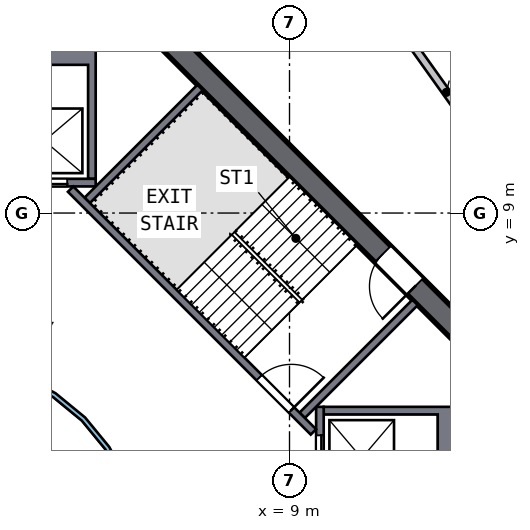
"""IFC4 building model, lengths in metres.
Left out: names, types, materials, properties, quantities, classifications, styles, units other than length and angle.
Written with IfcOpenShell. Run it as: python <this file> out.ifc"""

import sys

from ifc_helpers import new_model, si_unit, direction, frame, frame_2d, origin, place, context, subcontext, project, spatial, polyline, rectangle, outline, extrude, element, fill, save


model = new_model("IFC4")
c1 = context("Model", 3, precision=1e-05, world=origin(), true_north=direction((0.0, 1.0)))
c2 = subcontext(c1, "Body", "Model", "MODEL_VIEW")
j1 = project(units=[si_unit("LENGTHUNIT", "METRE"), si_unit("PLANEANGLEUNIT", "RADIAN")], contexts=[c1])
p1 = place(None, origin())
s1 = spatial("IfcSite", under=j1, at=p1, CompositionType="ELEMENT")
p2 = place(p1, origin())
s2 = spatial("IfcBuilding", under=s1, at=p2, CompositionType="ELEMENT")
p3 = place(p2, frame((0.0, 0.0, 180.0)))
s3 = spatial("IfcBuildingStorey", under=s2, at=p3, CompositionType="ELEMENT", Elevation=180.0)
p4 = place(p3, frame((13.788, 5.587, 0.0), z_axis=(0.0, 0.0, 1.0), x_axis=(-0.707106781, 0.707106781, 0.0)))
e1 = element("IfcWall", 1, at=p4, inside=s3, PredefinedType="SHEAR", context=c2, shape_type="SweptSolid", body=[
    extrude(rectangle(XDim=11.598, YDim=0.6, at=frame_2d((5.799, 0.0))), origin(), (0.0, 0.0, 1.0), 3.5),
])
p5 = place(p4, frame((2.099, 0.0, 0.0)))
e2 = element("IfcOpeningElement", 2, at=p5, cuts=e1, PredefinedType="OPENING", context=c2, shape_type="SweptSolid", body=[
    extrude(rectangle(XDim=1.2, YDim=2.1, at=frame_2d((0.6, 1.05))), frame((0.0, 0.31, 0.0), z_axis=(0.0, -1.0, 0.0), x_axis=(1.0, 0.0, 0.0)), (0.0, 0.0, 1.0), 0.62),
])
p6 = place(p3, origin())
e3 = element("IfcWall", 3, at=p6, inside=s3, PredefinedType="SOLIDWALL", context=c2, shape_type="SweptSolid", body=[
    extrude(outline(polyline([(13.4, 3.9), (13.4, 1.2), (9.9, 1.2), (9.9, 1.4), (12.9, 1.4), (12.9, 3.7), (9.9, 3.7), (9.9, 3.9), (13.4, 3.9)])), origin(), (0.0, 0.0, 1.0), 3.19),
])
p7 = place(p3, frame((9.8, 1.2, 0.0), z_axis=(0.0, 0.0, 1.0), x_axis=(0.0, 1.0, 0.0)))
e4 = element("IfcWall", 4, at=p7, inside=s3, PredefinedType="SOLIDWALL", context=c2, shape_type="SweptSolid", body=[
    extrude(rectangle(XDim=2.7, YDim=0.2, at=frame_2d((1.35, 0.0))), origin(), (0.0, 0.0, 1.0), 3.19),
])
p8 = place(p7, frame((0.75, 0.0, 0.0)))
e5 = element("IfcOpeningElement", 5, at=p8, cuts=e4, PredefinedType="OPENING", context=c2, shape_type="SweptSolid", body=[
    extrude(rectangle(XDim=1.2, YDim=2.1, at=frame_2d((0.6, 1.05))), frame((0.0, 0.11, 0.0), z_axis=(0.0, -1.0, 0.0), x_axis=(1.0, 0.0, 0.0)), (0.0, 0.0, 1.0), 0.22),
])
p9 = place(p3, origin())
e6 = element("IfcWall", 6, at=p9, inside=s3, PredefinedType="SOLIDWALL", context=c2, shape_type="SweptSolid", body=[
    extrude(outline(polyline([(3.9, 9.9), (3.7, 9.9), (3.7, 12.9), (1.4, 12.9), (1.4, 9.9), (1.2, 9.9), (1.2, 13.4), (3.9, 13.4), (3.9, 9.9)])), origin(), (0.0, 0.0, 1.0), 3.19),
])
p10 = place(p3, frame((1.2, 9.8, 0.0), z_axis=(0.0, 0.0, 1.0), x_axis=(1.0, 0.0, 0.0)))
e7 = element("IfcWall", 7, at=p10, inside=s3, PredefinedType="SOLIDWALL", context=c2, shape_type="SweptSolid", body=[
    extrude(rectangle(XDim=2.7, YDim=0.2, at=frame_2d((1.35, 0.0))), origin(), (0.0, 0.0, 1.0), 3.19),
])
p11 = place(p10, frame((0.75, 0.0, 0.0)))
e8 = element("IfcOpeningElement", 8, at=p11, cuts=e7, PredefinedType="OPENING", context=c2, shape_type="SweptSolid", body=[
    extrude(rectangle(XDim=1.2, YDim=2.1, at=frame_2d((0.6, 1.05))), frame((0.0, 0.11, 0.0), z_axis=(0.0, -1.0, 0.0), x_axis=(1.0, 0.0, 0.0)), (0.0, 0.0, 1.0), 0.22),
])
p12 = place(p3, frame((3.24, 9.629, 0.0), z_axis=(0.0, 0.0, 1.0), x_axis=(0.707106781, -0.707106781, 0.0)))
e9 = element("IfcWall", 9, at=p12, inside=s3, PredefinedType="SOLIDWALL", context=c2, shape_type="SweptSolid", body=[
    extrude(rectangle(XDim=9.036, YDim=0.2, at=frame_2d((4.518, 0.0))), origin(), (0.0, 0.0, 1.0), 3.19),
])
p13 = place(p12, frame((7.018, 0.0, 0.0)))
e10 = element("IfcOpeningElement", 10, at=p13, cuts=e9, PredefinedType="OPENING", context=c2, shape_type="SweptSolid", body=[
    extrude(rectangle(XDim=1.2, YDim=2.1, at=frame_2d((0.6, 1.05))), frame((0.0, 0.11, 0.0), z_axis=(0.0, -1.0, 0.0), x_axis=(1.0, 0.0, 0.0)), (0.0, 0.0, 1.0), 0.22),
])
for number, where, z_axis, x_axis in (
    (11, (9.334, 3.677, 0.0), (0.0, 0.0, 1.0), (0.707, 0.707, 0.0)),
    (12, (3.677, 9.334, 0.0), (0.0, 0.0, 1.0), (0.707, 0.707, 0.0)),
):
    element("IfcWall", number, at=place(p3, frame(where, z_axis=z_axis, x_axis=x_axis)), inside=s3, PredefinedType="SOLIDWALL", context=c2, shape_type="SweptSolid", body=[
        extrude(rectangle(XDim=4.2, YDim=0.2, at=frame_2d((2.1, 0.0))), origin(), (0.0, 0.0, 1.0), 3.19),
    ])
p14 = place(p3, origin())
e13 = element("IfcWall", 13, at=p14, inside=s3, PredefinedType="SOLIDWALL", context=c2, shape_type="SweptSolid", body=[
    extrude(outline(polyline([(5.021, -0.999), (4.73, -1.959), (4.257, -2.844), (3.62, -3.62), (2.844, -4.257), (1.959, -4.73), (0.999, -5.021), (0.0, -5.12), (-0.999, -5.021), (-1.959, -4.73), (-2.844, -4.257), (-3.62, -3.62), (-4.257, -2.844), (-4.73, -1.959), (-5.021, -0.999), (-5.12, 0.0), (-5.021, 0.999), (-4.73, 1.959), (-4.257, 2.844), (-3.62, 3.62), (-2.844, 4.257), (-1.959, 4.73), (-0.999, 5.021), (0.0, 5.12), (0.999, 5.021), (1.959, 4.73), (2.844, 4.257), (3.62, 3.62), (4.257, 2.844), (4.73, 1.959), (5.021, 0.999), (5.12, 0.0), (5.021, -0.999)]), holes=[polyline([(4.904, 0.976), (4.619, 1.913), (4.157, 2.778), (3.535, 3.535), (2.778, 4.157), (1.913, 4.619), (0.976, 4.904), (0.0, 5.0), (-0.976, 4.904), (-1.913, 4.619), (-2.778, 4.157), (-3.535, 3.535), (-4.157, 2.778), (-4.619, 1.913), (-4.904, 0.976), (-5.0, 0.0), (-4.904, -0.976), (-4.619, -1.913), (-4.157, -2.778), (-3.535, -3.535), (-2.778, -4.157), (-1.913, -4.619), (-0.976, -4.904), (0.0, -5.0), (0.976, -4.904), (1.913, -4.619), (2.778, -4.157), (3.535, -3.535), (4.157, -2.778), (4.619, -1.913), (4.904, -0.976), (5.0, 0.0), (4.904, 0.976)])]), origin(), (0.0, 0.0, 1.0), 3.19),
])
p15 = place(p3, frame((11.689, 14.19, 0.0), z_axis=(0.0, 0.0, 1.0), x_axis=(0.581002663, -0.813901656, 0.0)))
e14 = element("IfcWall", 14, at=p15, inside=s3, PredefinedType="SOLIDWALL", context=c2, shape_type="SweptSolid", body=[
    extrude(rectangle(XDim=9.316, YDim=0.2, at=frame_2d((4.658, 0.0))), origin(), (0.0, 0.0, 1.0), 3.19),
])
p16 = place(p15, frame((5.15, 0.0, 0.0)))
e15 = element("IfcOpeningElement", 15, at=p16, cuts=e14, PredefinedType="OPENING", context=c2, shape_type="SweptSolid", body=[
    extrude(rectangle(XDim=1.0, YDim=2.1, at=frame_2d((0.5, 1.05))), frame((0.0, 0.11, 0.0), z_axis=(0.0, -1.0, 0.0), x_axis=(1.0, 0.0, 0.0)), (0.0, 0.0, 1.0), 0.22),
])
p17 = place(p8, origin())
e16 = element("IfcDoor", 16, at=p17, inside=s3, OperationType="DOUBLE_DOOR_SLIDING", PredefinedType="DOOR", context=c2, shape_type="SweptSolid", body=[
    extrude(rectangle(XDim=1.2, YDim=2.1, at=frame_2d((0.6, 1.05))), frame((0.0, 0.025, 0.0), z_axis=(0.0, -1.0, 0.0), x_axis=(1.0, 0.0, 0.0)), (0.0, 0.0, 1.0), 0.05),
])
fill(e5, e16)
p18 = place(p11, origin())
e17 = element("IfcDoor", 17, at=p18, inside=s3, OperationType="DOUBLE_DOOR_SLIDING", PredefinedType="DOOR", context=c2, shape_type="SweptSolid", body=[
    extrude(rectangle(XDim=1.2, YDim=2.1, at=frame_2d((0.6, 1.05))), frame((0.0, 0.025, 0.0), z_axis=(0.0, -1.0, 0.0), x_axis=(1.0, 0.0, 0.0)), (0.0, 0.0, 1.0), 0.05),
])
fill(e8, e17)
p19 = place(p13, origin())
e18 = element("IfcDoor", 18, at=p19, inside=s3, OperationType="SINGLE_SWING_RIGHT", PredefinedType="DOOR", context=c2, shape_type="SweptSolid", body=[
    extrude(rectangle(XDim=1.2, YDim=2.1, at=frame_2d((0.6, 1.05))), frame((0.0, 0.025, 0.0), z_axis=(0.0, -1.0, 0.0), x_axis=(1.0, 0.0, 0.0)), (0.0, 0.0, 1.0), 0.05),
])
fill(e10, e18)
p20 = place(p5, origin())
e19 = element("IfcDoor", 19, at=p20, inside=s3, OperationType="SINGLE_SWING_LEFT", PredefinedType="DOOR", context=c2, shape_type="SweptSolid", body=[
    extrude(rectangle(XDim=1.2, YDim=2.1, at=frame_2d((0.6, 1.05))), frame((0.0, 0.025, 0.0), z_axis=(0.0, -1.0, 0.0), x_axis=(1.0, 0.0, 0.0)), (0.0, 0.0, 1.0), 0.05),
])
fill(e2, e19)
save(model, sys.argv[1])
